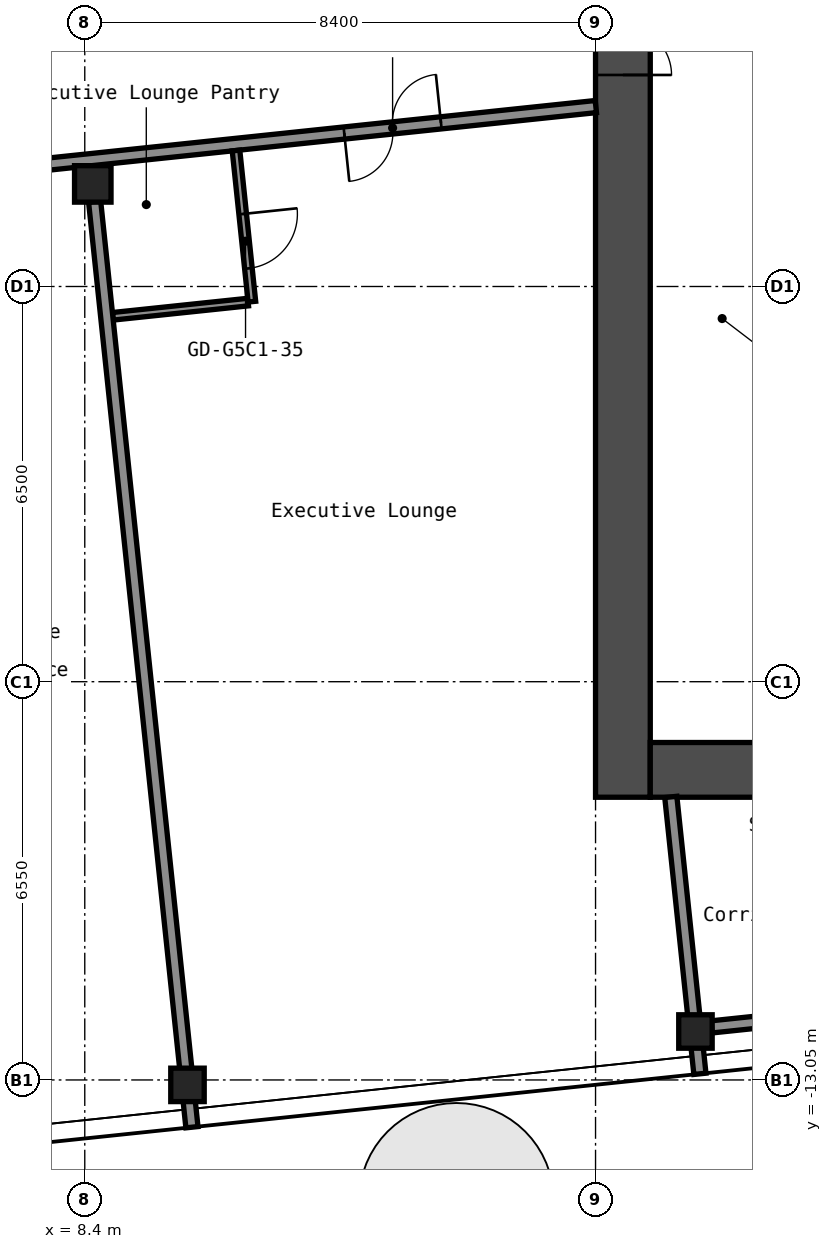
"""IFC4 building model, lengths in metres.
Left out: names, types, materials, properties, quantities, classifications, styles, units other than length and angle.
Written with IfcOpenShell. Run it as: python <this file> out.ifc"""

import sys

from ifc_helpers import new_model, si_unit, direction, frame, frame_2d, origin, origin_2d, place, context, subcontext, project, spatial, rectangle, hollow_rectangle, extrude, element, fill, save


model = new_model("IFC4")
c1 = context("Model", 3, precision=1e-05, world=origin(), true_north=direction((0.0, 1.0)))
c2 = subcontext(c1, "Body", "Model", "MODEL_VIEW")
j1 = project(units=[si_unit("LENGTHUNIT", "METRE"), si_unit("PLANEANGLEUNIT", "RADIAN")], contexts=[c1])
p1 = place(None, origin())
s1 = spatial("IfcSite", under=j1, at=p1, CompositionType="ELEMENT")
p2 = place(p1, origin())
s2 = spatial("IfcBuilding", under=s1, at=p2, CompositionType="ELEMENT")
p3 = place(p2, frame((0.0, 0.0, 258.2)))
s3 = spatial("IfcBuildingStorey", under=s2, at=p3, CompositionType="ELEMENT", Elevation=258.2)
p4 = place(p3, frame((10.089, -13.131, 0.0), z_axis=(0.0, 0.0, 1.0), x_axis=(1.0, 0.0, 0.0)))
e1 = element("IfcColumn", 1, at=p4, inside=s3, PredefinedType="COLUMN", context=c2, shape_type="SweptSolid", body=[
    extrude(hollow_rectangle(XDim=0.55, YDim=0.55, WallThickness=0.022, InnerFilletRadius=0.033, OuterFilletRadius=0.055, at=origin_2d()), origin(), (0.0, 0.0, 1.0), 2.75),
])
p5 = place(p3, frame((8.532, 1.688, 0.0), z_axis=(0.0, 0.0, 1.0), x_axis=(1.0, 0.0, 0.0)))
e2 = element("IfcColumn", 2, at=p5, inside=s3, PredefinedType="COLUMN", context=c2, shape_type="SweptSolid", body=[
    extrude(hollow_rectangle(XDim=0.6, YDim=0.6, WallThickness=0.025, InnerFilletRadius=0.038, OuterFilletRadius=0.062, at=origin_2d()), origin(), (0.0, 0.0, 1.0), 2.75),
])
p6 = place(p3, frame((18.443, -12.253, 0.0), z_axis=(0.0, 0.0, 1.0), x_axis=(1.0, 0.0, 0.0)))
e3 = element("IfcColumn", 3, at=p6, inside=s3, PredefinedType="COLUMN", context=c2, shape_type="SweptSolid", body=[
    extrude(hollow_rectangle(XDim=0.55, YDim=0.55, WallThickness=0.022, InnerFilletRadius=0.033, OuterFilletRadius=0.055, at=origin_2d()), origin(), (0.0, 0.0, 1.0), 2.75),
])
p7 = place(p3, frame((17.25, -8.4, 0.0), z_axis=(0.0, 0.0, 1.0), x_axis=(0.0, 1.0, 0.0)))
e4 = element("IfcWall", 4, at=p7, inside=s3, PredefinedType="SHEAR", context=c2, shape_type="SweptSolid", body=[
    extrude(rectangle(XDim=16.8, YDim=0.9, at=frame_2d((8.4, 0.0))), origin(), (0.0, 0.0, 1.0), 2.75),
])
p8 = place(p7, frame((11.879, 0.0, 0.0)))
e5 = element("IfcOpeningElement", 5, at=p8, cuts=e4, PredefinedType="OPENING", context=c2, shape_type="SweptSolid", body=[
    extrude(rectangle(XDim=1.6, YDim=2.1, at=frame_2d((0.8, 1.05))), frame((0.0, 0.46, 0.0), z_axis=(0.0, -1.0, 0.0), x_axis=(1.0, 0.0, 0.0)), (0.0, 0.0, 1.0), 0.92),
])
p9 = place(p3, frame((17.7, -7.95, 0.0), z_axis=(0.0, 0.0, 1.0), x_axis=(1.0, 0.0, 0.0)))
e6 = element("IfcWall", 6, at=p9, inside=s3, PredefinedType="SHEAR", context=c2, shape_type="SweptSolid", body=[
    extrude(rectangle(XDim=15.0, YDim=0.9, at=frame_2d((7.5, 0.0))), origin(), (0.0, 0.0, 1.0), 2.75),
])
p10 = place(p9, frame((2.55, 0.0, 0.0)))
e7 = element("IfcOpeningElement", 7, at=p10, cuts=e6, PredefinedType="OPENING", context=c2, shape_type="SweptSolid", body=[
    extrude(rectangle(XDim=1.0, YDim=2.1, at=frame_2d((0.5, 1.05))), frame((0.0, 0.46, 0.0), z_axis=(0.0, -1.0, 0.0), x_axis=(1.0, 0.0, 0.0)), (0.0, 0.0, 1.0), 0.92),
])
p11 = place(p3, frame((18.708, -12.177, 0.0), z_axis=(0.0, 0.0, 1.0), x_axis=(0.994521604238, 0.104531233147, 0.0)))
e8 = element("IfcWall", 8, at=p11, inside=s3, PredefinedType="PARTITIONING", context=c2, shape_type="SweptSolid", body=[
    extrude(rectangle(XDim=19.698, YDim=0.2, at=frame_2d((9.849, 0.0))), origin(), (0.0, 0.0, 1.0), 2.75),
])
p12 = place(p3, frame((8.861, -0.49, 0.0), z_axis=(0.0, 0.0, 1.0), x_axis=(0.99452218011, 0.104525754092, 0.0)))
e9 = element("IfcWall", 9, at=p12, inside=s3, PredefinedType="PARTITIONING", context=c2, shape_type="SweptSolid", body=[
    extrude(rectangle(XDim=2.238, YDim=0.125, at=frame_2d((1.119, 0.0))), origin(), (0.0, 0.0, 1.0), 2.75),
])
p13 = place(p3, frame((-16.572, -0.549, 0.0), z_axis=(0.0, 0.0, 1.0), x_axis=(0.994521146831, 0.104535584879, 0.0)))
e10 = element("IfcWall", 10, at=p13, inside=s3, PredefinedType="PARTITIONING", context=c2, shape_type="SweptSolid", body=[
    extrude(rectangle(XDim=33.561, YDim=0.2, at=frame_2d((16.78, 0.0))), origin(), (0.0, 0.0, 1.0), 2.75),
])
p14 = place(p13, frame((1.82, 0.0, 0.0)))
e11 = element("IfcOpeningElement", 11, at=p14, cuts=e10, PredefinedType="OPENING", context=c2, shape_type="SweptSolid", body=[
    extrude(rectangle(XDim=0.9, YDim=2.1, at=frame_2d((0.45, 1.05))), frame((0.0, 0.11, 0.0), z_axis=(0.0, -1.0, 0.0), x_axis=(1.0, 0.0, 0.0)), (0.0, 0.0, 1.0), 0.22),
])
p15 = place(p13, frame((6.02, 0.0, 0.0)))
e12 = element("IfcOpeningElement", 12, at=p15, cuts=e10, PredefinedType="OPENING", context=c2, shape_type="SweptSolid", body=[
    extrude(rectangle(XDim=0.9, YDim=2.1, at=frame_2d((0.45, 1.05))), frame((0.0, 0.11, 0.0), z_axis=(0.0, -1.0, 0.0), x_axis=(1.0, 0.0, 0.0)), (0.0, 0.0, 1.0), 0.22),
])
p16 = place(p13, frame((11.25, 0.0, 0.0)))
e13 = element("IfcOpeningElement", 13, at=p16, cuts=e10, PredefinedType="OPENING", context=c2, shape_type="SweptSolid", body=[
    extrude(rectangle(XDim=1.0, YDim=2.1, at=frame_2d((0.5, 1.05))), frame((0.0, 0.11, 0.0), z_axis=(0.0, -1.0, 0.0), x_axis=(1.0, 0.0, 0.0)), (0.0, 0.0, 1.0), 0.22),
])
p17 = place(p13, frame((12.95, 0.0, 0.0)))
e14 = element("IfcOpeningElement", 14, at=p17, cuts=e10, PredefinedType="OPENING", context=c2, shape_type="SweptSolid", body=[
    extrude(rectangle(XDim=1.0, YDim=2.1, at=frame_2d((0.5, 1.05))), frame((0.0, 0.11, 0.0), z_axis=(0.0, -1.0, 0.0), x_axis=(1.0, 0.0, 0.0)), (0.0, 0.0, 1.0), 0.22),
])
p18 = place(p13, frame((17.86, 0.0, 0.0)))
e15 = element("IfcOpeningElement", 15, at=p18, cuts=e10, PredefinedType="OPENING", context=c2, shape_type="SweptSolid", body=[
    extrude(rectangle(XDim=0.9, YDim=2.1, at=frame_2d((0.45, 1.05))), frame((0.0, 0.11, 0.0), z_axis=(0.0, -1.0, 0.0), x_axis=(1.0, 0.0, 0.0)), (0.0, 0.0, 1.0), 0.22),
])
p19 = place(p13, frame((22.06, 0.0, 0.0)))
e16 = element("IfcOpeningElement", 16, at=p19, cuts=e10, PredefinedType="OPENING", context=c2, shape_type="SweptSolid", body=[
    extrude(rectangle(XDim=0.9, YDim=2.1, at=frame_2d((0.45, 1.05))), frame((0.0, 0.11, 0.0), z_axis=(0.0, -1.0, 0.0), x_axis=(1.0, 0.0, 0.0)), (0.0, 0.0, 1.0), 0.22),
])
p20 = place(p13, frame((29.4, 0.0, 0.0)))
e17 = element("IfcOpeningElement", 17, at=p20, cuts=e10, PredefinedType="OPENING", context=c2, shape_type="SweptSolid", body=[
    extrude(rectangle(XDim=1.6, YDim=2.1, at=frame_2d((0.8, 1.05))), frame((0.0, 0.11, 0.0), z_axis=(0.0, -1.0, 0.0), x_axis=(1.0, 0.0, 0.0)), (0.0, 0.0, 1.0), 0.22),
])
p21 = place(p3, frame((-16.805, 2.041, 0.0), z_axis=(0.0, 0.0, 1.0), x_axis=(0.994521146831, 0.104535584879, 0.0)))
e18 = element("IfcWall", 18, at=p21, inside=s3, PredefinedType="PARTITIONING", context=c2, shape_type="SweptSolid", body=[
    extrude(rectangle(XDim=33.561, YDim=0.2, at=frame_2d((16.78, 0.0))), origin(), (0.0, 0.0, 1.0), 2.75),
])
p22 = place(p21, frame((1.276, 0.0, 0.0)))
e19 = element("IfcOpeningElement", 19, at=p22, cuts=e18, PredefinedType="OPENING", context=c2, shape_type="SweptSolid", body=[
    extrude(rectangle(XDim=0.9, YDim=2.1, at=frame_2d((0.45, 1.05))), frame((0.0, 0.11, 0.0), z_axis=(0.0, -1.0, 0.0), x_axis=(1.0, 0.0, 0.0)), (0.0, 0.0, 1.0), 0.22),
])
p23 = place(p21, frame((5.476, 0.0, 0.0)))
e20 = element("IfcOpeningElement", 20, at=p23, cuts=e18, PredefinedType="OPENING", context=c2, shape_type="SweptSolid", body=[
    extrude(rectangle(XDim=0.9, YDim=2.1, at=frame_2d((0.45, 1.05))), frame((0.0, 0.11, 0.0), z_axis=(0.0, -1.0, 0.0), x_axis=(1.0, 0.0, 0.0)), (0.0, 0.0, 1.0), 0.22),
])
p24 = place(p21, frame((11.211, 0.0, 0.0)))
e21 = element("IfcOpeningElement", 21, at=p24, cuts=e18, PredefinedType="OPENING", context=c2, shape_type="SweptSolid", body=[
    extrude(rectangle(XDim=1.0, YDim=2.1, at=frame_2d((0.5, 1.05))), frame((0.0, 0.11, 0.0), z_axis=(0.0, -1.0, 0.0), x_axis=(1.0, 0.0, 0.0)), (0.0, 0.0, 1.0), 0.22),
])
p25 = place(p21, frame((12.911, 0.0, 0.0)))
e22 = element("IfcOpeningElement", 22, at=p25, cuts=e18, PredefinedType="OPENING", context=c2, shape_type="SweptSolid", body=[
    extrude(rectangle(XDim=1.0, YDim=2.1, at=frame_2d((0.5, 1.05))), frame((0.0, 0.11, 0.0), z_axis=(0.0, -1.0, 0.0), x_axis=(1.0, 0.0, 0.0)), (0.0, 0.0, 1.0), 0.22),
])
p26 = place(p21, frame((18.831, 0.0, 0.0)))
e23 = element("IfcOpeningElement", 23, at=p26, cuts=e18, PredefinedType="OPENING", context=c2, shape_type="SweptSolid", body=[
    extrude(rectangle(XDim=0.9, YDim=2.1, at=frame_2d((0.45, 1.05))), frame((0.0, 0.11, 0.0), z_axis=(0.0, -1.0, 0.0), x_axis=(1.0, 0.0, 0.0)), (0.0, 0.0, 1.0), 0.22),
])
p27 = place(p21, frame((23.031, 0.0, 0.0)))
e24 = element("IfcOpeningElement", 24, at=p27, cuts=e18, PredefinedType="OPENING", context=c2, shape_type="SweptSolid", body=[
    extrude(rectangle(XDim=0.9, YDim=2.1, at=frame_2d((0.45, 1.05))), frame((0.0, 0.11, 0.0), z_axis=(0.0, -1.0, 0.0), x_axis=(1.0, 0.0, 0.0)), (0.0, 0.0, 1.0), 0.22),
])
p28 = place(p21, frame((26.641, 0.0, 0.0)))
e25 = element("IfcOpeningElement", 25, at=p28, cuts=e18, PredefinedType="OPENING", context=c2, shape_type="SweptSolid", body=[
    extrude(rectangle(XDim=0.9, YDim=2.1, at=frame_2d((0.45, 1.05))), frame((0.0, 0.11, 0.0), z_axis=(0.0, -1.0, 0.0), x_axis=(1.0, 0.0, 0.0)), (0.0, 0.0, 1.0), 0.22),
])
p29 = place(p21, frame((30.841, 0.0, 0.0)))
e26 = element("IfcOpeningElement", 26, at=p29, cuts=e18, PredefinedType="OPENING", context=c2, shape_type="SweptSolid", body=[
    extrude(rectangle(XDim=0.9, YDim=2.1, at=frame_2d((0.45, 1.05))), frame((0.0, 0.11, 0.0), z_axis=(0.0, -1.0, 0.0), x_axis=(1.0, 0.0, 0.0)), (0.0, 0.0, 1.0), 0.22),
])
p30 = place(p3, frame((10.162, -13.827, 0.0), z_axis=(0.0, 0.0, 1.0), x_axis=(-0.104523729364, 0.99452239291, 0.0)))
e27 = element("IfcWall", 27, at=p30, inside=s3, PredefinedType="PARTITIONING", context=c2, shape_type="SweptSolid", body=[
    extrude(rectangle(XDim=15.308, YDim=0.2, at=frame_2d((7.654, 0.0))), origin(), (0.0, 0.0, 1.0), 2.75),
])
p31 = place(p3, frame((11.148, -0.25, 0.0), z_axis=(0.0, 0.0, 1.0), x_axis=(-0.104491611519, 0.994525767953, 0.0)))
e28 = element("IfcWall", 28, at=p31, inside=s3, PredefinedType="PARTITIONING", context=c2, shape_type="SweptSolid", body=[
    extrude(rectangle(XDim=2.5, YDim=0.125, at=frame_2d((1.25, 0.0))), origin(), (0.0, 0.0, 1.0), 2.75),
])
p32 = place(p31, frame((0.55, 0.0, 0.0)))
e29 = element("IfcOpeningElement", 29, at=p32, cuts=e28, PredefinedType="OPENING", context=c2, shape_type="SweptSolid", body=[
    extrude(rectangle(XDim=0.9, YDim=2.1, at=frame_2d((0.45, 1.05))), frame((0.0, 0.073, 0.0), z_axis=(0.0, -1.0, 0.0), x_axis=(1.0, 0.0, 0.0)), (0.0, 0.0, 1.0), 0.145),
])
p33 = place(p3, frame((18.516, -12.949, 0.0), z_axis=(0.0, 0.0, 1.0), x_axis=(-0.104548796268, 0.994519758074, 0.0)))
e30 = element("IfcWall", 30, at=p33, inside=s3, PredefinedType="PARTITIONING", context=c2, shape_type="SweptSolid", body=[
    extrude(rectangle(XDim=4.579, YDim=0.2, at=frame_2d((2.29, 0.0))), origin(), (0.0, 0.0, 1.0), 2.75),
])
p34 = place(p8, origin())
e31 = element("IfcDoor", 31, at=p34, inside=s3, OperationType="DOUBLE_DOOR_SINGLE_SWING", PredefinedType="DOOR", context=c2, shape_type="SweptSolid", body=[
    extrude(rectangle(XDim=1.6, YDim=2.1, at=frame_2d((0.8, 1.05))), frame((0.0, 0.025, 0.0), z_axis=(0.0, -1.0, 0.0), x_axis=(1.0, 0.0, 0.0)), (0.0, 0.0, 1.0), 0.05),
])
fill(e5, e31)
p35 = place(p20, origin())
e32 = element("IfcDoor", 32, at=p35, inside=s3, OperationType="DOUBLE_DOOR_SINGLE_SWING", PredefinedType="DOOR", context=c2, shape_type="SweptSolid", body=[
    extrude(rectangle(XDim=1.6, YDim=2.1, at=frame_2d((0.8, 1.05))), frame((0.0, 0.025, 0.0), z_axis=(0.0, -1.0, 0.0), x_axis=(1.0, 0.0, 0.0)), (0.0, 0.0, 1.0), 0.05),
])
fill(e17, e32)
p36 = place(p32, origin())
e33 = element("IfcDoor", 33, at=p36, inside=s3, OperationType="SINGLE_SWING_RIGHT", PredefinedType="DOOR", context=c2, shape_type="SweptSolid", body=[
    extrude(rectangle(XDim=0.9, YDim=2.1, at=frame_2d((0.45, 1.05))), frame((0.0, 0.025, 0.0), z_axis=(0.0, -1.0, 0.0), x_axis=(1.0, 0.0, 0.0)), (0.0, 0.0, 1.0), 0.05),
])
fill(e29, e33)
save(model, sys.argv[1])
